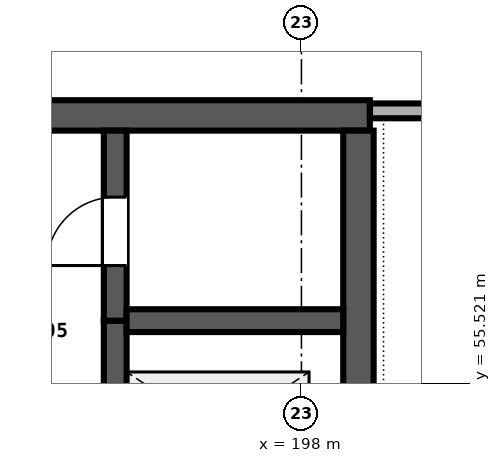
"""IFC4 building model, lengths in metres.
Left out: names, types, materials, properties, quantities, classifications, styles, units other than length and angle.
Written with IfcOpenShell. Run it as: python <this file> out.ifc"""

import sys

from ifc_helpers import new_model, si_unit, direction, frame, frame_2d, origin, place, context, subcontext, project, spatial, rectangle, extrude, element, fill, save


model = new_model("IFC4")
c1 = context("Model", 3, precision=1e-05, world=origin(), true_north=direction((0.0, 1.0)))
c2 = subcontext(c1, "Body", "Model", "MODEL_VIEW")
j1 = project(units=[si_unit("LENGTHUNIT", "METRE"), si_unit("PLANEANGLEUNIT", "RADIAN")], contexts=[c1])
p1 = place(None, origin())
s1 = spatial("IfcSite", under=j1, at=p1, CompositionType="ELEMENT")
p2 = place(p1, origin())
s2 = spatial("IfcBuilding", under=s1, at=p2, CompositionType="ELEMENT")
p3 = place(p2, origin())
s3 = spatial("IfcBuildingStorey", under=s2, at=p3, CompositionType="ELEMENT", Elevation=0.0)
p4 = place(p3, frame((198.9, 59.05, 0.0), z_axis=(0.0, 0.0, 1.0), x_axis=(-1.0, 0.0, 0.0)))
e1 = element("IfcWall", 1, at=p4, inside=s3, PredefinedType="SHEAR", context=c2, shape_type="SweptSolid", body=[
    extrude(rectangle(XDim=18.0, YDim=0.4, at=frame_2d((9.0, 0.0))), origin(), (0.0, 0.0, 1.0), 4.5),
])
p5 = place(p4, frame((4.7, 0.0, 0.0)))
e2 = element("IfcOpeningElement", 2, at=p5, cuts=e1, PredefinedType="OPENING", context=c2, shape_type="SweptSolid", body=[
    extrude(rectangle(XDim=1.9, YDim=2.25, at=frame_2d((0.95, 1.125))), frame((0.0, 0.21, 0.0), z_axis=(0.0, -1.0, 0.0), x_axis=(1.0, 0.0, 0.0)), (0.0, 0.0, 1.0), 0.42),
])
p6 = place(p3, frame((198.75, 53.55, 0.0), z_axis=(0.0, 0.0, 1.0), x_axis=(0.0, 1.0, 0.0)))
e3 = element("IfcWall", 3, at=p6, inside=s3, PredefinedType="SHEAR", context=c2, shape_type="SweptSolid", body=[
    extrude(rectangle(XDim=5.3, YDim=0.4, at=frame_2d((2.65, 0.0))), origin(), (0.0, 0.0, 1.0), 4.5),
])
p7 = place(p3, frame((195.55, 53.55, 0.0), z_axis=(0.0, 0.0, 1.0), x_axis=(0.0, 1.0, 0.0)))
e4 = element("IfcWall", 4, at=p7, inside=s3, PredefinedType="SHEAR", context=c2, shape_type="SweptSolid", body=[
    extrude(rectangle(XDim=2.8, YDim=0.3, at=frame_2d((1.4, 0.0))), origin(), (0.0, 0.0, 1.0), 4.5),
])
p8 = place(p7, frame((0.775, 0.0, 0.0)))
e5 = element("IfcOpeningElement", 5, at=p8, cuts=e4, PredefinedType="OPENING", context=c2, shape_type="SweptSolid", body=[
    extrude(rectangle(XDim=1.1, YDim=2.1, at=frame_2d((0.55, 1.05))), frame((0.0, 0.16, 0.0), z_axis=(0.0, -1.0, 0.0), x_axis=(1.0, 0.0, 0.0)), (0.0, 0.0, 1.0), 0.32),
])
p9 = place(p3, frame((195.55, 56.35, 0.0), z_axis=(0.0, 0.0, 1.0), x_axis=(0.0, 1.0, 0.0)))
e6 = element("IfcWall", 6, at=p9, inside=s3, PredefinedType="SHEAR", context=c2, shape_type="SweptSolid", body=[
    extrude(rectangle(XDim=2.5, YDim=0.3, at=frame_2d((1.25, 0.0))), origin(), (0.0, 0.0, 1.0), 4.5),
])
p10 = place(p9, frame((0.725, 0.0, 0.0)))
e7 = element("IfcOpeningElement", 7, at=p10, cuts=e6, PredefinedType="OPENING", context=c2, shape_type="SweptSolid", body=[
    extrude(rectangle(XDim=0.9, YDim=2.1, at=frame_2d((0.45, 1.05))), frame((0.0, 0.16, 0.0), z_axis=(0.0, -1.0, 0.0), x_axis=(1.0, 0.0, 0.0)), (0.0, 0.0, 1.0), 0.32),
])
p11 = place(p3, frame((195.7, 56.35, 0.0), z_axis=(0.0, 0.0, 1.0), x_axis=(1.0, 0.0, 0.0)))
e8 = element("IfcWall", 8, at=p11, inside=s3, PredefinedType="SHEAR", context=c2, shape_type="SweptSolid", body=[
    extrude(rectangle(XDim=2.85, YDim=0.3, at=frame_2d((1.425, 0.0))), origin(), (0.0, 0.0, 1.0), 4.5),
])
p12 = place(p3, frame((198.902, 59.11, 0.0), z_axis=(0.0, 0.0, 1.0), x_axis=(1.0, 0.0, 0.0)))
e9 = element("IfcWall", 9, at=p12, inside=s3, PredefinedType="PARTITIONING", context=c2, shape_type="SweptSolid", body=[
    extrude(rectangle(XDim=2.038, YDim=0.195, at=frame_2d((1.019, 0.0))), origin(), (0.0, 0.0, 1.0), 3.28),
])
p13 = place(p10, origin())
e10 = element("IfcDoor", 10, at=p13, inside=s3, OperationType="SINGLE_SWING_LEFT", PredefinedType="DOOR", context=c2, shape_type="SweptSolid", body=[
    extrude(rectangle(XDim=0.9, YDim=2.1, at=frame_2d((0.45, 1.05))), frame((0.0, 0.025, 0.0), z_axis=(0.0, -1.0, 0.0), x_axis=(1.0, 0.0, 0.0)), (0.0, 0.0, 1.0), 0.05),
])
fill(e7, e10)
save(model, sys.argv[1])
